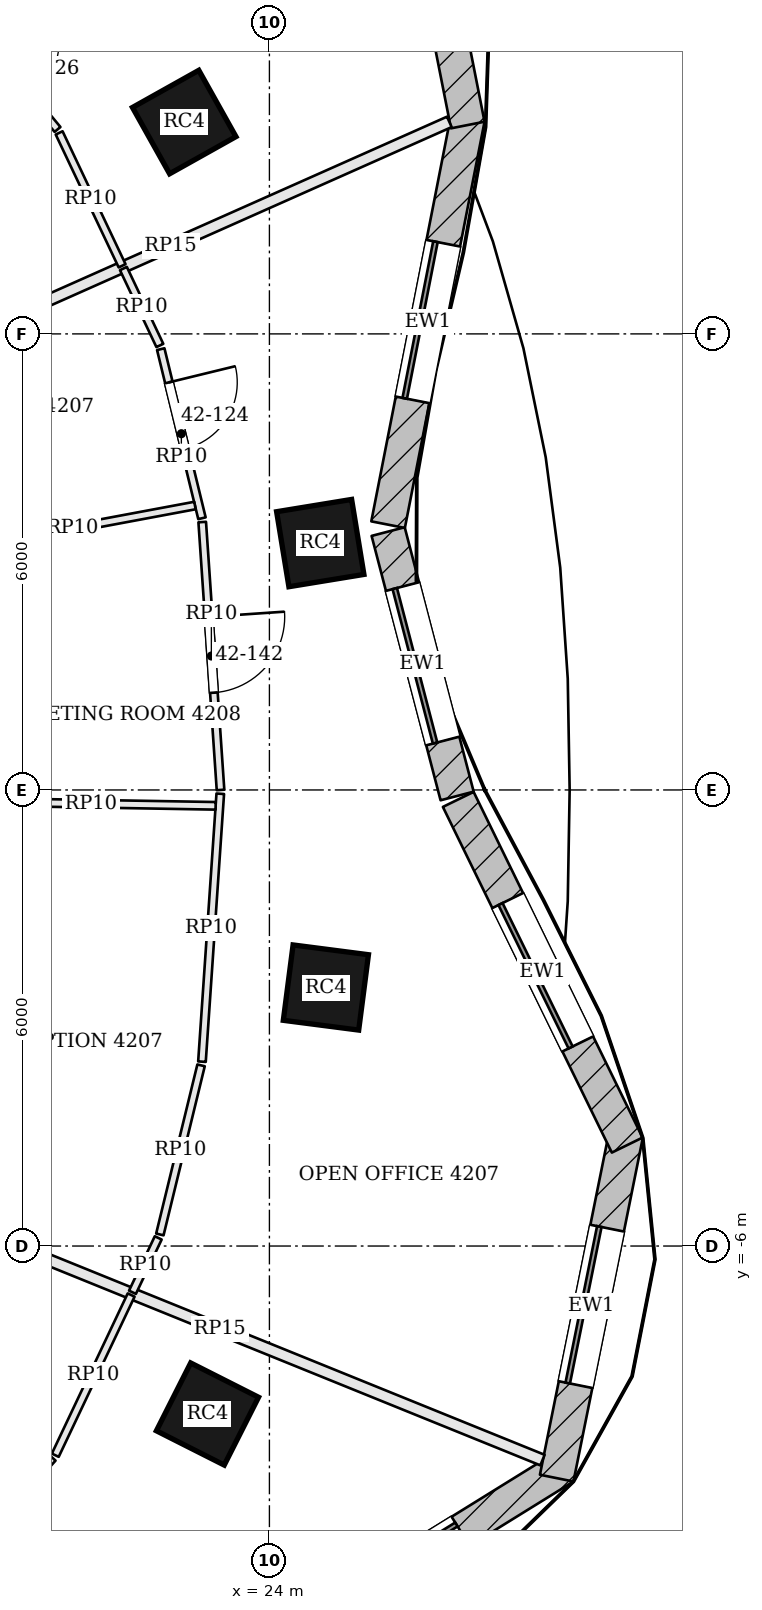
"""IFC4 building model, lengths in metres.
Left out: names, types, materials, properties, quantities, classifications, styles, units other than length and angle.
Written with IfcOpenShell. Run it as: python <this file> out.ifc"""

import sys

from ifc_helpers import new_model, si_unit, direction, frame, frame_2d, origin, origin_2d, place, context, subcontext, project, spatial, rectangle, extrude, element, fill, save


model = new_model("IFC4")
c1 = context("Model", 3, precision=1e-05, world=origin(), true_north=direction((0.0, 1.0)))
c2 = subcontext(c1, "Body", "Model", "MODEL_VIEW")
j1 = project(units=[si_unit("LENGTHUNIT", "METRE"), si_unit("PLANEANGLEUNIT", "RADIAN")], contexts=[c1])
p1 = place(None, origin())
s1 = spatial("IfcSite", under=j1, at=p1, CompositionType="ELEMENT")
p2 = place(p1, origin())
s2 = spatial("IfcBuilding", under=s1, at=p2, CompositionType="ELEMENT")
p3 = place(p2, frame((0.0, 0.0, 174.0)))
s3 = spatial("IfcBuildingStorey", under=s2, at=p3, CompositionType="ELEMENT", Elevation=174.0)
for number, where, z_axis, x_axis in (
    (1, (24.669, 3.248, -0.7), (0.0, 0.0, 1.0), (-0.162, 0.987, 0.0)),
    (2, (22.879, 8.787, -0.7), (0.0, 0.0, 1.0), (-0.489, 0.873, 0.0)),
    (3, (23.185, -8.21, -0.7), (0.0, 0.0, 1.0), (0.451, 0.893, 0.0)),
    (4, (24.743, -2.599, -0.7), (0.0, 0.0, 1.0), (0.128, 0.992, 0.0)),
):
    element("IfcColumn", number, at=place(p3, frame(where, z_axis=z_axis, x_axis=x_axis)), inside=s3, PredefinedType="COLUMN", context=c2, shape_type="SweptSolid", body=[
        extrude(rectangle(XDim=1.0, YDim=1.0, at=origin_2d()), origin(), (0.0, 0.0, 1.0), 4.6),
    ])
p4 = place(p3, frame((26.469, -0.079, 0.0), z_axis=(0.0, 0.0, 1.0), x_axis=(-0.252446779859, 0.967610780913, 0.0)))
e5 = element("IfcWall", 5, at=p4, inside=s3, PredefinedType="SOLIDWALL", context=c2, shape_type="SweptSolid", body=[
    extrude(rectangle(XDim=3.595, YDim=0.45, at=frame_2d((1.797, 0.0))), origin(), (0.0, 0.0, 1.0), 3.7),
])
p5 = place(p4, frame((0.747, 0.0, 0.9)))
e6 = element("IfcOpeningElement", 6, at=p5, cuts=e5, PredefinedType="OPENING", context=c2, shape_type="SweptSolid", body=[
    extrude(rectangle(XDim=2.1, YDim=2.3, at=frame_2d((1.05, 1.15))), frame((0.0, 0.235, 0.0), z_axis=(0.0, -1.0, 0.0), x_axis=(1.0, 0.0, 0.0)), (0.0, 0.0, 1.0), 0.47),
])
p6 = place(p3, frame((25.561, 3.49, 0.0), z_axis=(0.0, 0.0, 1.0), x_axis=(0.192494026297, 0.981298145234, 0.0)))
e7 = element("IfcWall", 7, at=p6, inside=s3, PredefinedType="SOLIDWALL", context=c2, shape_type="SweptSolid", body=[
    extrude(rectangle(XDim=5.446, YDim=0.45, at=frame_2d((2.723, 0.0))), origin(), (0.0, 0.0, 1.0), 3.7),
])
p7 = place(p6, frame((1.673, 0.0, 0.9)))
e8 = element("IfcOpeningElement", 8, at=p7, cuts=e7, PredefinedType="OPENING", context=c2, shape_type="SweptSolid", body=[
    extrude(rectangle(XDim=2.1, YDim=2.3, at=frame_2d((1.05, 1.15))), frame((0.0, 0.235, 0.0), z_axis=(0.0, -1.0, 0.0), x_axis=(1.0, 0.0, 0.0)), (0.0, 0.0, 1.0), 0.47),
])
p8 = place(p3, frame((26.61, 8.748, 0.0), z_axis=(0.0, 0.0, 1.0), x_axis=(-0.193923166402, 0.981016720312, 0.0)))
e9 = element("IfcWall", 9, at=p8, inside=s3, PredefinedType="SOLIDWALL", context=c2, shape_type="SweptSolid", body=[
    extrude(rectangle(XDim=4.518, YDim=0.45, at=frame_2d((2.259, 0.0))), origin(), (0.0, 0.0, 1.0), 3.7),
])
p9 = place(p8, frame((1.209, 0.0, 0.9)))
e10 = element("IfcOpeningElement", 10, at=p9, cuts=e9, PredefinedType="OPENING", context=c2, shape_type="SweptSolid", body=[
    extrude(rectangle(XDim=2.1, YDim=2.3, at=frame_2d((1.05, 1.15))), frame((0.0, 0.235, 0.0), z_axis=(0.0, -1.0, 0.0), x_axis=(1.0, 0.0, 0.0)), (0.0, 0.0, 1.0), 0.47),
])
p10 = place(p3, frame((23.368, -11.701, 0.0), z_axis=(0.0, 0.0, 1.0), x_axis=(0.850251408633, 0.526376806211, 0.0)))
e11 = element("IfcWall", 11, at=p10, inside=s3, PredefinedType="SOLIDWALL", context=c2, shape_type="SweptSolid", body=[
    extrude(rectangle(XDim=5.302, YDim=0.45, at=frame_2d((2.651, 0.0))), origin(), (0.0, 0.0, 1.0), 3.7),
])
p11 = place(p10, frame((1.601, 0.0, 0.9)))
e12 = element("IfcOpeningElement", 12, at=p11, cuts=e11, PredefinedType="OPENING", context=c2, shape_type="SweptSolid", body=[
    extrude(rectangle(XDim=2.1, YDim=2.3, at=frame_2d((1.05, 1.15))), frame((0.0, 0.235, 0.0), z_axis=(0.0, -1.0, 0.0), x_axis=(1.0, 0.0, 0.0)), (0.0, 0.0, 1.0), 0.47),
])
p12 = place(p3, frame((27.78, -9.053, 0.0), z_axis=(0.0, 0.0, 1.0), x_axis=(0.197796229105, 0.980243159503, 0.0)))
e13 = element("IfcWall", 13, at=p12, inside=s3, PredefinedType="SOLIDWALL", context=c2, shape_type="SweptSolid", body=[
    extrude(rectangle(XDim=4.61, YDim=0.45, at=frame_2d((2.305, 0.0))), origin(), (0.0, 0.0, 1.0), 3.7),
])
p13 = place(p12, frame((1.255, 0.0, 0.9)))
e14 = element("IfcOpeningElement", 14, at=p13, cuts=e13, PredefinedType="OPENING", context=c2, shape_type="SweptSolid", body=[
    extrude(rectangle(XDim=2.1, YDim=2.3, at=frame_2d((1.05, 1.15))), frame((0.0, 0.235, 0.0), z_axis=(0.0, -1.0, 0.0), x_axis=(1.0, 0.0, 0.0)), (0.0, 0.0, 1.0), 0.47),
])
p14 = place(p3, frame((28.707, -4.672, 0.0), z_axis=(0.0, 0.0, 1.0), x_axis=(-0.439053549989, 0.898460895221, 0.0)))
e15 = element("IfcWall", 15, at=p14, inside=s3, PredefinedType="SOLIDWALL", context=c2, shape_type="SweptSolid", body=[
    extrude(rectangle(XDim=5.062, YDim=0.45, at=frame_2d((2.531, 0.0))), origin(), (0.0, 0.0, 1.0), 3.7),
])
p15 = place(p14, frame((1.481, 0.0, 0.9)))
e16 = element("IfcOpeningElement", 16, at=p15, cuts=e15, PredefinedType="OPENING", context=c2, shape_type="SweptSolid", body=[
    extrude(rectangle(XDim=2.1, YDim=2.3, at=frame_2d((1.05, 1.15))), frame((0.0, 0.235, 0.0), z_axis=(0.0, -1.0, 0.0), x_axis=(1.0, 0.0, 0.0)), (0.0, 0.0, 1.0), 0.47),
])
p16 = place(p3, frame((21.493, 15.114, 0.0), z_axis=(0.0, 0.0, 1.0), x_axis=(-0.659778549164, -0.751460089467, 0.0)))
e17 = element("IfcWall", 17, at=p16, inside=s3, PredefinedType="PARTITIONING", context=c2, shape_type="SweptSolid", body=[
    extrude(rectangle(XDim=7.877, YDim=0.15, at=frame_2d((3.938, 0.0))), origin(), (0.0, 0.0, 1.0), 3.234),
])
p17 = place(p3, frame((27.593, -8.816, 0.0), z_axis=(0.0, 0.0, 1.0), x_axis=(-0.9267854071, 0.375591279433, 0.0)))
e18 = element("IfcWall", 18, at=p17, inside=s3, PredefinedType="PARTITIONING", context=c2, shape_type="SweptSolid", body=[
    extrude(rectangle(XDim=9.161, YDim=0.15, at=frame_2d((4.58, 0.0))), origin(), (0.0, 0.0, 1.0), 3.234),
])
p18 = place(p3, frame((26.367, 8.789, 0.0), z_axis=(0.0, 0.0, 1.0), x_axis=(-0.913673557468, -0.406448804137, 0.0)))
e19 = element("IfcWall", 19, at=p18, inside=s3, PredefinedType="PARTITIONING", context=c2, shape_type="SweptSolid", body=[
    extrude(rectangle(XDim=8.029, YDim=0.15, at=frame_2d((4.014, 0.0))), origin(), (0.0, 0.0, 1.0), 3.234),
])
p19 = place(p3, frame((22.181, -6.645, 0.0), z_axis=(0.0, 0.0, 1.0), x_axis=(-0.428144841987, -0.903710127353, 0.0)))
e20 = element("IfcWall", 20, at=p19, inside=s3, PredefinedType="PARTITIONING", context=c2, shape_type="SweptSolid", body=[
    extrude(rectangle(XDim=2.332, YDim=0.1, at=frame_2d((1.166, 0.0))), origin(), (0.0, 0.0, 1.0), 3.084),
])
p20 = place(p3, frame((21.149, -8.789, 0.0), z_axis=(0.0, 0.0, 1.0), x_axis=(-0.666915902537, -0.745132994132, 0.0)))
e21 = element("IfcWall", 21, at=p20, inside=s3, PredefinedType="PARTITIONING", context=c2, shape_type="SweptSolid", body=[
    extrude(rectangle(XDim=4.186, YDim=0.1, at=frame_2d((2.093, 0.0))), origin(), (0.0, 0.0, 1.0), 3.084),
])
p21 = place(p20, frame((1.869, 0.0, 0.0)))
e22 = element("IfcOpeningElement", 22, at=p21, cuts=e21, PredefinedType="OPENING", context=c2, shape_type="SweptSolid", body=[
    extrude(rectangle(XDim=0.9, YDim=2.1, at=frame_2d((0.45, 1.05))), frame((0.0, 0.06, 0.0), z_axis=(0.0, -1.0, 0.0), x_axis=(1.0, 0.0, 0.0)), (0.0, 0.0, 1.0), 0.12),
])
p22 = place(p3, frame((22.079, 6.86, 0.0), z_axis=(0.0, 0.0, 1.0), x_axis=(0.428105084675, -0.903728961844, 0.0)))
e23 = element("IfcWall", 23, at=p22, inside=s3, PredefinedType="PARTITIONING", context=c2, shape_type="SweptSolid", body=[
    extrude(rectangle(XDim=1.12, YDim=0.1, at=frame_2d((0.56, 0.0))), origin(), (0.0, 0.0, 1.0), 3.084),
])
p23 = place(p3, frame((22.57, 5.799, 0.0), z_axis=(0.0, 0.0, 1.0), x_axis=(0.236811358433, -0.971555649727, 0.0)))
e24 = element("IfcWall", 24, at=p23, inside=s3, PredefinedType="PARTITIONING", context=c2, shape_type="SweptSolid", body=[
    extrude(rectangle(XDim=2.29, YDim=0.1, at=frame_2d((1.145, 0.0))), origin(), (0.0, 0.0, 1.0), 3.084),
])
p24 = place(p23, frame((0.45, 0.0, 0.0)))
e25 = element("IfcOpeningElement", 25, at=p24, cuts=e24, PredefinedType="OPENING", context=c2, shape_type="SweptSolid", body=[
    extrude(rectangle(XDim=0.9, YDim=2.1, at=frame_2d((0.45, 1.05))), frame((0.0, 0.06, 0.0), z_axis=(0.0, -1.0, 0.0), x_axis=(1.0, 0.0, 0.0)), (0.0, 0.0, 1.0), 0.12),
])
p25 = place(p3, frame((23.116, 3.525, 0.0), z_axis=(0.0, 0.0, 1.0), x_axis=(0.068138009452, -0.997675905125, 0.0)))
e26 = element("IfcWall", 26, at=p25, inside=s3, PredefinedType="PARTITIONING", context=c2, shape_type="SweptSolid", body=[
    extrude(rectangle(XDim=3.533, YDim=0.1, at=frame_2d((1.767, 0.0))), origin(), (0.0, 0.0, 1.0), 3.084),
])
p26 = place(p25, frame((1.25, 0.0, 0.0)))
e27 = element("IfcOpeningElement", 27, at=p26, cuts=e26, PredefinedType="OPENING", context=c2, shape_type="SweptSolid", body=[
    extrude(rectangle(XDim=1.0, YDim=2.4, at=frame_2d((0.5, 1.2))), frame((0.0, 0.06, 0.0), z_axis=(0.0, -1.0, 0.0), x_axis=(1.0, 0.0, 0.0)), (0.0, 0.0, 1.0), 0.12),
])
p27 = place(p3, frame((23.354, -0.05, 0.0), z_axis=(0.0, 0.0, 1.0), x_axis=(-0.06820679361, -0.99767120501, 0.0)))
e28 = element("IfcWall", 28, at=p27, inside=s3, PredefinedType="PARTITIONING", context=c2, shape_type="SweptSolid", body=[
    extrude(rectangle(XDim=3.533, YDim=0.1, at=frame_2d((1.767, 0.0))), origin(), (0.0, 0.0, 1.0), 3.084),
])
p28 = place(p3, frame((23.101, -3.623, 0.0), z_axis=(0.0, 0.0, 1.0), x_axis=(-0.236811358433, -0.971555649727, 0.0)))
e29 = element("IfcWall", 29, at=p28, inside=s3, PredefinedType="PARTITIONING", context=c2, shape_type="SweptSolid", body=[
    extrude(rectangle(XDim=2.29, YDim=0.1, at=frame_2d((1.145, 0.0))), origin(), (0.0, 0.0, 1.0), 3.084),
])
p29 = place(p3, frame((22.537, -5.893, 0.0), z_axis=(0.0, 0.0, 1.0), x_axis=(-0.427993557618, -0.903781784856, 0.0)))
e30 = element("IfcWall", 30, at=p29, inside=s3, PredefinedType="PARTITIONING", context=c2, shape_type="SweptSolid", body=[
    extrude(rectangle(XDim=0.792, YDim=0.1, at=frame_2d((0.396, 0.0))), origin(), (0.0, 0.0, 1.0), 3.084),
])
p30 = place(p3, frame((20.013, -0.153, 0.0), z_axis=(0.0, 0.0, 1.0), x_axis=(0.999854678593, -0.017047630214, 0.0)))
e31 = element("IfcWall", 31, at=p30, inside=s3, PredefinedType="PARTITIONING", context=c2, shape_type="SweptSolid", body=[
    extrude(rectangle(XDim=3.28, YDim=0.1, at=frame_2d((1.64, 0.0))), origin(), (0.0, 0.0, 1.0), 3.084),
])
p31 = place(p3, frame((19.796, 3.14, 0.0), z_axis=(0.0, 0.0, 1.0), x_axis=(0.983010938824, 0.183546980778, 0.0)))
e32 = element("IfcWall", 32, at=p31, inside=s3, PredefinedType="PARTITIONING", context=c2, shape_type="SweptSolid", body=[
    extrude(rectangle(XDim=3.28, YDim=0.1, at=frame_2d((1.64, 0.0))), origin(), (0.0, 0.0, 1.0), 3.084),
])
p32 = place(p3, frame((19.206, 11.121, 0.0), z_axis=(0.0, 0.0, 1.0), x_axis=(0.636597206989, -0.771196470462, 0.0)))
e33 = element("IfcWall", 33, at=p32, inside=s3, PredefinedType="PARTITIONING", context=c2, shape_type="SweptSolid", body=[
    extrude(rectangle(XDim=3.152, YDim=0.1, at=frame_2d((1.576, 0.0))), origin(), (0.0, 0.0, 1.0), 3.084),
])
p33 = place(p32, frame((1.619, 0.0, 0.0)))
e34 = element("IfcOpeningElement", 34, at=p33, cuts=e33, PredefinedType="OPENING", context=c2, shape_type="SweptSolid", body=[
    extrude(rectangle(XDim=1.0, YDim=2.1, at=frame_2d((0.5, 1.05))), frame((0.0, 0.06, 0.0), z_axis=(0.0, -1.0, 0.0), x_axis=(1.0, 0.0, 0.0)), (0.0, 0.0, 1.0), 0.12),
])
p34 = place(p3, frame((21.234, 8.644, 0.0), z_axis=(0.0, 0.0, 1.0), x_axis=(0.428183987328, -0.903691580682, 0.0)))
e35 = element("IfcWall", 35, at=p34, inside=s3, PredefinedType="PARTITIONING", context=c2, shape_type="SweptSolid", body=[
    extrude(rectangle(XDim=1.935, YDim=0.1, at=frame_2d((0.967, 0.0))), origin(), (0.0, 0.0, 1.0), 3.084),
])
p35 = place(p5, origin())
e36 = element("IfcWindow", 36, at=p35, inside=s3, PartitioningType="SINGLE_PANEL", PredefinedType="WINDOW", context=c2, shape_type="SweptSolid", body=[
    extrude(rectangle(XDim=2.1, YDim=2.3, at=frame_2d((1.05, 1.15))), frame((0.0, 0.135, 0.0), z_axis=(0.0, -1.0, 0.0), x_axis=(1.0, 0.0, 0.0)), (0.0, 0.0, 1.0), 0.06),
])
fill(e6, e36)
p36 = place(p7, origin())
e37 = element("IfcWindow", 37, at=p36, inside=s3, PartitioningType="SINGLE_PANEL", PredefinedType="WINDOW", context=c2, shape_type="SweptSolid", body=[
    extrude(rectangle(XDim=2.1, YDim=2.3, at=frame_2d((1.05, 1.15))), frame((0.0, 0.135, 0.0), z_axis=(0.0, -1.0, 0.0), x_axis=(1.0, 0.0, 0.0)), (0.0, 0.0, 1.0), 0.06),
])
fill(e8, e37)
p37 = place(p11, origin())
e38 = element("IfcWindow", 38, at=p37, inside=s3, PartitioningType="SINGLE_PANEL", PredefinedType="WINDOW", context=c2, shape_type="SweptSolid", body=[
    extrude(rectangle(XDim=2.1, YDim=2.3, at=frame_2d((1.05, 1.15))), frame((0.0, 0.135, 0.0), z_axis=(0.0, -1.0, 0.0), x_axis=(1.0, 0.0, 0.0)), (0.0, 0.0, 1.0), 0.06),
])
fill(e12, e38)
p38 = place(p13, origin())
e39 = element("IfcWindow", 39, at=p38, inside=s3, PartitioningType="SINGLE_PANEL", PredefinedType="WINDOW", context=c2, shape_type="SweptSolid", body=[
    extrude(rectangle(XDim=2.1, YDim=2.3, at=frame_2d((1.05, 1.15))), frame((0.0, 0.135, 0.0), z_axis=(0.0, -1.0, 0.0), x_axis=(1.0, 0.0, 0.0)), (0.0, 0.0, 1.0), 0.06),
])
fill(e14, e39)
p39 = place(p15, origin())
e40 = element("IfcWindow", 40, at=p39, inside=s3, PartitioningType="SINGLE_PANEL", PredefinedType="WINDOW", context=c2, shape_type="SweptSolid", body=[
    extrude(rectangle(XDim=2.1, YDim=2.3, at=frame_2d((1.05, 1.15))), frame((0.0, 0.135, 0.0), z_axis=(0.0, -1.0, 0.0), x_axis=(1.0, 0.0, 0.0)), (0.0, 0.0, 1.0), 0.06),
])
fill(e16, e40)
p40 = place(p24, origin())
e41 = element("IfcDoor", 41, at=p40, inside=s3, OperationType="SINGLE_SWING_LEFT", PredefinedType="DOOR", context=c2, shape_type="SweptSolid", body=[
    extrude(rectangle(XDim=0.9, YDim=2.1, at=frame_2d((0.45, 1.05))), frame((0.0, 0.025, 0.0), z_axis=(0.0, -1.0, 0.0), x_axis=(1.0, 0.0, 0.0)), (0.0, 0.0, 1.0), 0.05),
])
fill(e25, e41)
p41 = place(p26, origin())
e42 = element("IfcDoor", 42, at=p41, inside=s3, OperationType="SINGLE_SWING_LEFT", PredefinedType="DOOR", context=c2, shape_type="SweptSolid", body=[
    extrude(rectangle(XDim=1.0, YDim=2.4, at=frame_2d((0.5, 1.2))), frame((0.0, 0.025, 0.0), z_axis=(0.0, -1.0, 0.0), x_axis=(1.0, 0.0, 0.0)), (0.0, 0.0, 1.0), 0.05),
])
fill(e27, e42)
save(model, sys.argv[1])
